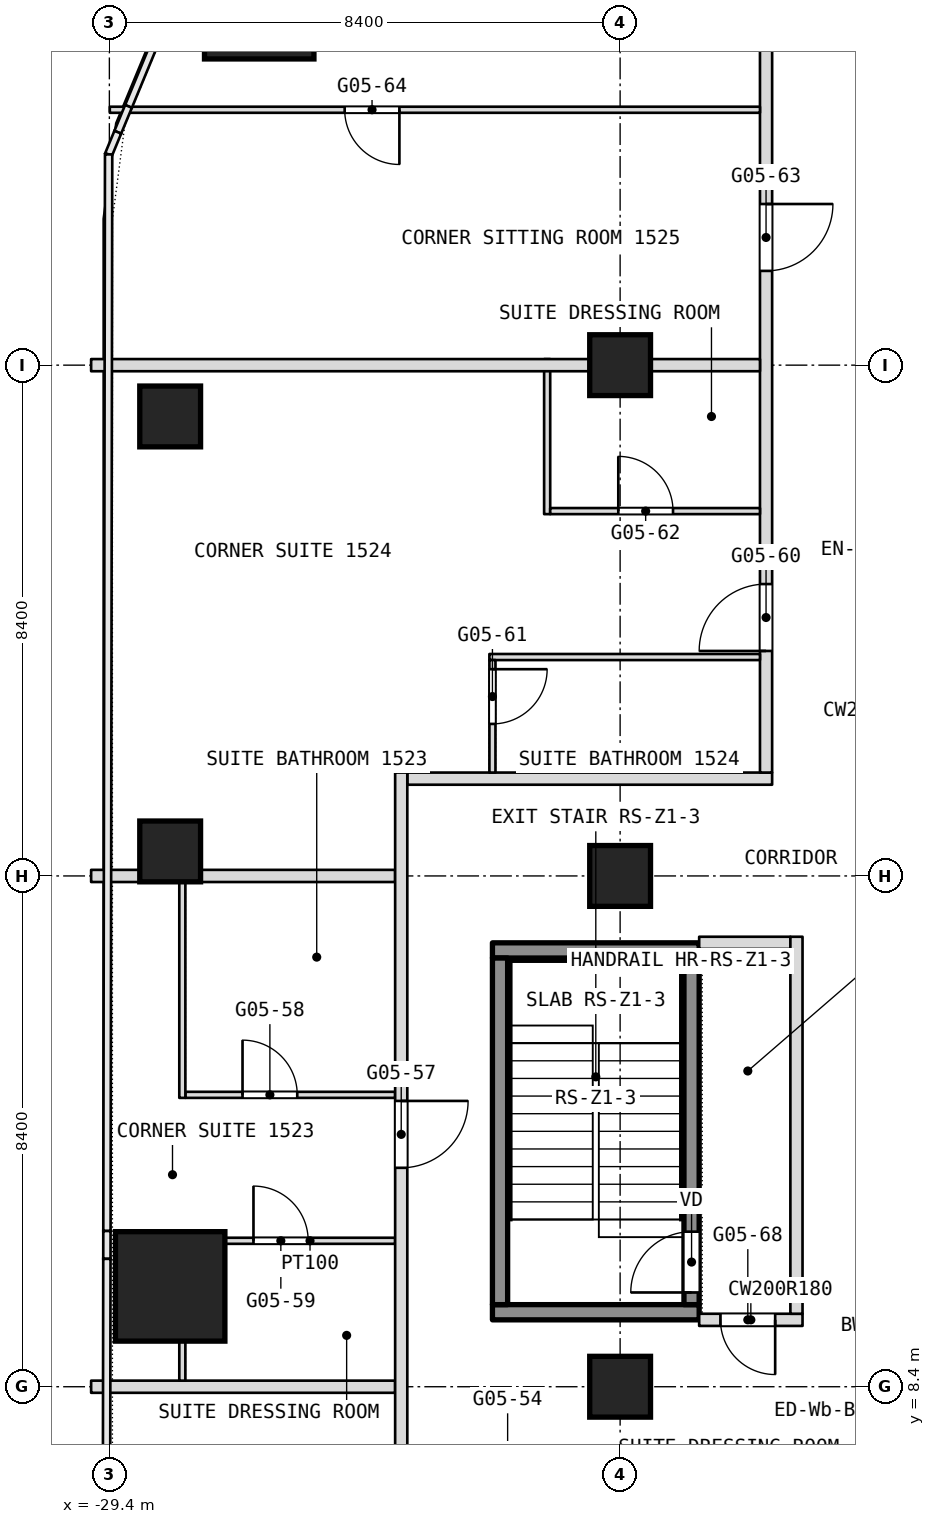
"""IFC4 building model, lengths in metres.
Left out: names, types, materials, properties, quantities, classifications, styles, units other than length and angle.
Written with IfcOpenShell. Run it as: python <this file> out.ifc"""

import sys

from ifc_helpers import new_model, si_unit, direction, frame, frame_2d, origin, origin_2d, place, context, subcontext, project, spatial, rectangle, extrude, element, fill, save


model = new_model("IFC4")
c1 = context("Model", 3, precision=1e-05, world=origin(), true_north=direction((0.0, 1.0)))
c2 = subcontext(c1, "Body", "Model", "MODEL_VIEW")
j1 = project(units=[si_unit("LENGTHUNIT", "METRE"), si_unit("PLANEANGLEUNIT", "RADIAN")], contexts=[c1])
p1 = place(None, origin())
s1 = spatial("IfcSite", under=j1, at=p1, CompositionType="ELEMENT")
p2 = place(p1, origin())
s2 = spatial("IfcBuilding", under=s1, at=p2, CompositionType="ELEMENT")
p3 = place(p2, frame((0.0, 0.0, 68.9)))
s3 = spatial("IfcBuildingStorey", under=s2, at=p3, CompositionType="ELEMENT", Elevation=68.9)
for number, where, z_axis, x_axis in (
    (1, (-26.936, 31.135, 0.0), (0.0, 0.0, 1.0), (1.0, 0.0, 0.0)),
    (2, (-28.4, 10.05, 0.0), (0.0, 0.0, 1.0), (1.0, 0.0, 0.0)),
):
    element("IfcColumn", number, at=place(p3, frame(where, z_axis=z_axis, x_axis=x_axis)), inside=s3, PredefinedType="COLUMN", context=c2, shape_type="SweptSolid", body=[
        extrude(rectangle(XDim=1.8, YDim=1.8, at=origin_2d()), origin(), (0.0, 0.0, 1.0), 3.6),
    ])
for number, where, z_axis, x_axis in (
    (3, (-21.0, 8.4, 0.0), (0.0, 0.0, 1.0), (1.0, 0.0, 0.0)),
    (4, (-21.0, 16.8, 0.0), (0.0, 0.0, 1.0), (1.0, 0.0, 0.0)),
    (5, (-21.0, 25.2, 0.0), (0.0, 0.0, 1.0), (1.0, 0.0, 0.0)),
    (6, (-28.4, 17.203, 0.0), (0.0, 0.0, 1.0), (1.0, 0.0, 0.0)),
    (7, (-28.4, 24.356, 0.0), (0.0, 0.0, 1.0), (1.0, 0.0, 0.0)),
):
    element("IfcColumn", number, at=place(p3, frame(where, z_axis=z_axis, x_axis=x_axis)), inside=s3, PredefinedType="COLUMN", context=c2, shape_type="SweptSolid", body=[
        extrude(rectangle(XDim=1.0, YDim=1.0, at=origin_2d()), origin(), (0.0, 0.0, 1.0), 3.6),
    ])
p4 = place(p3, frame((-29.7, 8.4, 0.0), z_axis=(0.0, 0.0, 1.0), x_axis=(1.0, 0.0, 0.0)))
e8 = element("IfcWall", 8, at=p4, inside=s3, PredefinedType="PARTITIONING", context=c2, shape_type="SweptSolid", body=[
    extrude(rectangle(XDim=5.0, YDim=0.2, at=frame_2d((2.5, 0.0))), origin(), (0.0, 0.0, 1.0), 2.84),
])
p5 = place(p3, frame((-19.7, 9.5, 0.0), z_axis=(0.0, 0.0, 1.0), x_axis=(1.0, 0.0, 0.0)))
e9 = element("IfcWall", 9, at=p5, inside=s3, PredefinedType="PARTITIONING", context=c2, shape_type="SweptSolid", body=[
    extrude(rectangle(XDim=1.7, YDim=0.2, at=frame_2d((0.85, 0.0))), origin(), (0.0, 0.0, 1.0), 3.34),
])
p6 = place(p5, frame((0.35, 0.0, 0.0)))
e10 = element("IfcOpeningElement", 10, at=p6, cuts=e9, PredefinedType="OPENING", context=c2, shape_type="SweptSolid", body=[
    extrude(rectangle(XDim=0.9, YDim=2.1, at=frame_2d((0.45, 1.05))), frame((0.0, 0.1, 0.0), z_axis=(0.0, -1.0, 0.0), x_axis=(1.0, 0.0, 0.0)), (0.0, 0.0, 1.0), 0.2),
])
p7 = place(p3, frame((-27.5, 10.8, 0.0), z_axis=(0.0, 0.0, 1.0), x_axis=(1.0, 0.0, 0.0)))
e11 = element("IfcWall", 11, at=p7, inside=s3, PredefinedType="PARTITIONING", context=c2, shape_type="SweptSolid", body=[
    extrude(rectangle(XDim=2.8, YDim=0.1, at=frame_2d((1.4, 0.0))), origin(), (0.0, 0.0, 1.0), 3.34),
])
p8 = place(p7, frame((0.47, 0.0, 0.0)))
e12 = element("IfcOpeningElement", 12, at=p8, cuts=e11, PredefinedType="OPENING", context=c2, shape_type="SweptSolid", body=[
    extrude(rectangle(XDim=0.9, YDim=2.1, at=frame_2d((0.45, 1.05))), frame((0.0, 0.05, 0.0), z_axis=(0.0, -1.0, 0.0), x_axis=(1.0, 0.0, 0.0)), (0.0, 0.0, 1.0), 0.1),
])
p9 = place(p3, frame((-28.15, 13.2, 0.0), z_axis=(0.0, 0.0, 1.0), x_axis=(1.0, 0.0, 0.0)))
e13 = element("IfcWall", 13, at=p9, inside=s3, PredefinedType="PARTITIONING", context=c2, shape_type="SweptSolid", body=[
    extrude(rectangle(XDim=3.45, YDim=0.1, at=frame_2d((1.725, 0.0))), origin(), (0.0, 0.0, 1.0), 3.34),
])
p10 = place(p9, frame((0.94, 0.0, 0.0)))
e14 = element("IfcOpeningElement", 14, at=p10, cuts=e13, PredefinedType="OPENING", context=c2, shape_type="SweptSolid", body=[
    extrude(rectangle(XDim=0.9, YDim=2.1, at=frame_2d((0.45, 1.05))), frame((0.0, 0.05, 0.0), z_axis=(0.0, -1.0, 0.0), x_axis=(1.0, 0.0, 0.0)), (0.0, 0.0, 1.0), 0.1),
])
p11 = place(p3, frame((-19.7, 15.7, 0.0), z_axis=(0.0, 0.0, 1.0), x_axis=(1.0, 0.0, 0.0)))
e15 = element("IfcWall", 15, at=p11, inside=s3, PredefinedType="PARTITIONING", context=c2, shape_type="SweptSolid", body=[
    extrude(rectangle(XDim=1.5, YDim=0.2, at=frame_2d((0.75, 0.0))), origin(), (0.0, 0.0, 1.0), 3.34),
])
p12 = place(p3, frame((-29.7, 16.8, 0.0), z_axis=(0.0, 0.0, 1.0), x_axis=(1.0, 0.0, 0.0)))
e16 = element("IfcWall", 16, at=p12, inside=s3, PredefinedType="PARTITIONING", context=c2, shape_type="SweptSolid", body=[
    extrude(rectangle(XDim=5.0, YDim=0.2, at=frame_2d((2.5, 0.0))), origin(), (0.0, 0.0, 1.0), 2.84),
])
p13 = place(p3, frame((-18.1, 9.6, 0.0), z_axis=(0.0, 0.0, 1.0), x_axis=(0.0, 1.0, 0.0)))
e17 = element("IfcWall", 17, at=p13, inside=s3, PredefinedType="PARTITIONING", context=c2, shape_type="SweptSolid", body=[
    extrude(rectangle(XDim=6.2, YDim=0.2, at=frame_2d((3.1, 0.0))), origin(), (0.0, 0.0, 1.0), 3.34),
])
p14 = place(p3, frame((-24.5, 18.4, 0.0), z_axis=(0.0, 0.0, 1.0), x_axis=(1.0, 0.0, 0.0)))
e18 = element("IfcWall", 18, at=p14, inside=s3, PredefinedType="PARTITIONING", context=c2, shape_type="SweptSolid", body=[
    extrude(rectangle(XDim=6.0, YDim=0.2, at=frame_2d((3.0, 0.0))), origin(), (0.0, 0.0, 1.0), 3.34),
])
p15 = place(p3, frame((-18.6, 18.5, 0.0), z_axis=(0.0, 0.0, 1.0), x_axis=(0.0, 1.0, 0.0)))
e19 = element("IfcWall", 19, at=p15, inside=s3, PredefinedType="PARTITIONING", context=c2, shape_type="SweptSolid", body=[
    extrude(rectangle(XDim=15.04, YDim=0.2, at=frame_2d((7.52, 0.0))), origin(), (0.0, 0.0, 1.0), 3.34),
])
p16 = place(p15, frame((2.0, 0.0, 0.0)))
e20 = element("IfcOpeningElement", 20, at=p16, cuts=e19, PredefinedType="OPENING", context=c2, shape_type="SweptSolid", body=[
    extrude(rectangle(XDim=1.1, YDim=2.1, at=frame_2d((0.55, 1.05))), frame((0.0, 0.1, 0.0), z_axis=(0.0, -1.0, 0.0), x_axis=(1.0, 0.0, 0.0)), (0.0, 0.0, 1.0), 0.2),
])
p17 = place(p15, frame((8.25, 0.0, 0.0)))
e21 = element("IfcOpeningElement", 21, at=p17, cuts=e19, PredefinedType="OPENING", context=c2, shape_type="SweptSolid", body=[
    extrude(rectangle(XDim=1.1, YDim=2.1, at=frame_2d((0.55, 1.05))), frame((0.0, 0.1, 0.0), z_axis=(0.0, -1.0, 0.0), x_axis=(1.0, 0.0, 0.0)), (0.0, 0.0, 1.0), 0.2),
])
p18 = place(p3, frame((-23.15, 20.4, 0.0), z_axis=(0.0, 0.0, 1.0), x_axis=(1.0, 0.0, 0.0)))
e22 = element("IfcWall", 22, at=p18, inside=s3, PredefinedType="PARTITIONING", context=c2, shape_type="SweptSolid", body=[
    extrude(rectangle(XDim=4.45, YDim=0.1, at=frame_2d((2.225, 0.0))), origin(), (0.0, 0.0, 1.0), 3.34),
])
p19 = place(p3, frame((-22.2, 22.75, 0.0), z_axis=(0.0, 0.0, 1.0), x_axis=(0.0, 1.0, 0.0)))
e23 = element("IfcWall", 23, at=p19, inside=s3, PredefinedType="PARTITIONING", context=c2, shape_type="SweptSolid", body=[
    extrude(rectangle(XDim=2.55, YDim=0.1, at=frame_2d((1.275, 0.0))), origin(), (0.0, 0.0, 1.0), 3.34),
])
p20 = place(p3, frame((-22.15, 22.8, 0.0), z_axis=(0.0, 0.0, 1.0), x_axis=(1.0, 0.0, 0.0)))
e24 = element("IfcWall", 24, at=p20, inside=s3, PredefinedType="PARTITIONING", context=c2, shape_type="SweptSolid", body=[
    extrude(rectangle(XDim=3.45, YDim=0.1, at=frame_2d((1.725, 0.0))), origin(), (0.0, 0.0, 1.0), 3.34),
])
p21 = place(p20, frame((1.12, 0.0, 0.0)))
e25 = element("IfcOpeningElement", 25, at=p21, cuts=e24, PredefinedType="OPENING", context=c2, shape_type="SweptSolid", body=[
    extrude(rectangle(XDim=0.9, YDim=2.1, at=frame_2d((0.45, 1.05))), frame((0.0, 0.05, 0.0), z_axis=(0.0, -1.0, 0.0), x_axis=(1.0, 0.0, 0.0)), (0.0, 0.0, 1.0), 0.1),
])
p22 = place(p3, frame((-23.1, 18.5, 0.0), z_axis=(0.0, 0.0, 1.0), x_axis=(0.0, 1.0, 0.0)))
e26 = element("IfcWall", 26, at=p22, inside=s3, PredefinedType="PARTITIONING", context=c2, shape_type="SweptSolid", body=[
    extrude(rectangle(XDim=1.85, YDim=0.1, at=frame_2d((0.925, 0.0))), origin(), (0.0, 0.0, 1.0), 3.34),
])
p23 = place(p22, frame((0.8, 0.0, 0.0)))
e27 = element("IfcOpeningElement", 27, at=p23, cuts=e26, PredefinedType="OPENING", context=c2, shape_type="SweptSolid", body=[
    extrude(rectangle(XDim=0.9, YDim=2.1, at=frame_2d((0.45, 1.05))), frame((0.0, 0.05, 0.0), z_axis=(0.0, -1.0, 0.0), x_axis=(1.0, 0.0, 0.0)), (0.0, 0.0, 1.0), 0.1),
])
p24 = place(p3, frame((-24.6, 6.9, 0.0), z_axis=(0.0, 0.0, 1.0), x_axis=(0.0, 1.0, 0.0)))
e28 = element("IfcWall", 28, at=p24, inside=s3, PredefinedType="PARTITIONING", context=c2, shape_type="SweptSolid", body=[
    extrude(rectangle(XDim=11.6, YDim=0.2, at=frame_2d((5.8, 0.0))), origin(), (0.0, 0.0, 1.0), 3.34),
])
p25 = place(p24, frame((5.1, 0.0, 0.0)))
e29 = element("IfcOpeningElement", 29, at=p25, cuts=e28, PredefinedType="OPENING", context=c2, shape_type="SweptSolid", body=[
    extrude(rectangle(XDim=1.1, YDim=2.1, at=frame_2d((0.55, 1.05))), frame((0.0, 0.1, 0.0), z_axis=(0.0, -1.0, 0.0), x_axis=(1.0, 0.0, 0.0)), (0.0, 0.0, 1.0), 0.2),
])
p26 = place(p3, frame((-29.7, 25.2, 0.0), z_axis=(0.0, 0.0, 1.0), x_axis=(1.0, 0.0, 0.0)))
e30 = element("IfcWall", 30, at=p26, inside=s3, PredefinedType="PARTITIONING", context=c2, shape_type="SweptSolid", body=[
    extrude(rectangle(XDim=11.0, YDim=0.2, at=frame_2d((5.5, 0.0))), origin(), (0.0, 0.0, 1.0), 2.84),
])
p27 = place(p3, frame((-28.2, 8.5, 0.0), z_axis=(0.0, 0.0, 1.0), x_axis=(0.0, 1.0, 0.0)))
e31 = element("IfcWall", 31, at=p27, inside=s3, PredefinedType="PARTITIONING", context=c2, shape_type="SweptSolid", body=[
    extrude(rectangle(XDim=0.65, YDim=0.1, at=frame_2d((0.325, 0.0))), origin(), (0.0, 0.0, 1.0), 2.94),
])
p28 = place(p3, frame((-28.2, 13.15, 0.0), z_axis=(0.0, 0.0, 1.0), x_axis=(0.0, 1.0, 0.0)))
e32 = element("IfcWall", 32, at=p28, inside=s3, PredefinedType="PARTITIONING", context=c2, shape_type="SweptSolid", body=[
    extrude(rectangle(XDim=3.75, YDim=0.1, at=frame_2d((1.875, 0.0))), origin(), (0.0, 0.0, 1.0), 2.94),
])
p29 = place(p3, frame((-29.393, 29.4, 0.0), z_axis=(0.0, 0.0, 1.0), x_axis=(1.0, 0.0, 0.0)))
e33 = element("IfcWall", 33, at=p29, inside=s3, PredefinedType="PARTITIONING", context=c2, shape_type="SweptSolid", body=[
    extrude(rectangle(XDim=10.693, YDim=0.1, at=frame_2d((5.347, 0.0))), origin(), (0.0, 0.0, 1.0), 3.34),
])
p30 = place(p29, frame((3.863, 0.0, 0.0)))
e34 = element("IfcOpeningElement", 34, at=p30, cuts=e33, PredefinedType="OPENING", context=c2, shape_type="SweptSolid", body=[
    extrude(rectangle(XDim=0.9, YDim=2.1, at=frame_2d((0.45, 1.05))), frame((0.0, 0.05, 0.0), z_axis=(0.0, -1.0, 0.0), x_axis=(1.0, 0.0, 0.0)), (0.0, 0.0, 1.0), 0.1),
])
for number, where, z_axis, x_axis in (
    (35, (-23.1, 9.625, 0.1), (0.0, 0.0, 1.0), (1.0, 0.0, 0.0)),
    (36, (-23.1, 15.575, 0.1), (0.0, 0.0, 1.0), (1.0, 0.0, 0.0)),
):
    element("IfcWall", number, at=place(p3, frame(where, z_axis=z_axis, x_axis=x_axis)), inside=s3, PredefinedType="SHEAR", context=c2, shape_type="SweptSolid", body=[
        extrude(rectangle(XDim=3.4, YDim=0.25, at=frame_2d((1.7, 0.0))), origin(), (0.0, 0.0, 1.0), 3.6),
    ])
p31 = place(p3, frame((-22.975, 9.75, 0.1), z_axis=(0.0, 0.0, 1.0), x_axis=(0.0, 1.0, 0.0)))
e37 = element("IfcWall", 37, at=p31, inside=s3, PredefinedType="SHEAR", context=c2, shape_type="SweptSolid", body=[
    extrude(rectangle(XDim=5.7, YDim=0.25, at=frame_2d((2.85, 0.0))), origin(), (0.0, 0.0, 1.0), 3.6),
])
p32 = place(p3, frame((-19.825, 9.75, 0.1), z_axis=(0.0, 0.0, 1.0), x_axis=(0.0, 1.0, 0.0)))
e38 = element("IfcWall", 38, at=p32, inside=s3, PredefinedType="SHEAR", context=c2, shape_type="SweptSolid", body=[
    extrude(rectangle(XDim=5.7, YDim=0.25, at=frame_2d((2.85, 0.0))), origin(), (0.0, 0.0, 1.0), 3.6),
])
p33 = place(p32, frame((0.2, 0.0, 0.0)))
e39 = element("IfcOpeningElement", 39, at=p33, cuts=e38, PredefinedType="OPENING", context=c2, shape_type="SweptSolid", body=[
    extrude(rectangle(XDim=1.0, YDim=2.1, at=frame_2d((0.5, 1.05))), frame((0.0, 0.125, 0.0), z_axis=(0.0, -1.0, 0.0), x_axis=(1.0, 0.0, 0.0)), (0.0, 0.0, 1.0), 0.25),
])
p34 = place(p6, origin())
e40 = element("IfcDoor", 40, at=p34, inside=s3, OperationType="SINGLE_SWING_RIGHT", PredefinedType="DOOR", context=c2, shape_type="SweptSolid", body=[
    extrude(rectangle(XDim=0.9, YDim=2.1, at=frame_2d((0.45, 1.05))), frame((0.0, 0.025, 0.0), z_axis=(0.0, -1.0, 0.0), x_axis=(1.0, 0.0, 0.0)), (0.0, 0.0, 1.0), 0.05),
])
fill(e10, e40)
p35 = place(p8, origin())
e41 = element("IfcDoor", 41, at=p35, inside=s3, OperationType="SINGLE_SWING_RIGHT", PredefinedType="DOOR", context=c2, shape_type="SweptSolid", body=[
    extrude(rectangle(XDim=0.9, YDim=2.1, at=frame_2d((0.45, 1.05))), frame((0.0, 0.025, 0.0), z_axis=(0.0, -1.0, 0.0), x_axis=(1.0, 0.0, 0.0)), (0.0, 0.0, 1.0), 0.05),
])
fill(e12, e41)
p36 = place(p10, origin())
e42 = element("IfcDoor", 42, at=p36, inside=s3, OperationType="SINGLE_SWING_LEFT", PredefinedType="DOOR", context=c2, shape_type="SweptSolid", body=[
    extrude(rectangle(XDim=0.9, YDim=2.1, at=frame_2d((0.45, 1.05))), frame((0.0, 0.025, 0.0), z_axis=(0.0, -1.0, 0.0), x_axis=(1.0, 0.0, 0.0)), (0.0, 0.0, 1.0), 0.05),
])
fill(e14, e42)
p37 = place(p16, origin())
e43 = element("IfcDoor", 43, at=p37, inside=s3, OperationType="SINGLE_SWING_LEFT", PredefinedType="DOOR", context=c2, shape_type="SweptSolid", body=[
    extrude(rectangle(XDim=1.1, YDim=2.1, at=frame_2d((0.55, 1.05))), frame((0.0, 0.025, 0.0), z_axis=(0.0, -1.0, 0.0), x_axis=(1.0, 0.0, 0.0)), (0.0, 0.0, 1.0), 0.05),
])
fill(e20, e43)
p38 = place(p17, origin())
e44 = element("IfcDoor", 44, at=p38, inside=s3, OperationType="SINGLE_SWING_RIGHT", PredefinedType="DOOR", context=c2, shape_type="SweptSolid", body=[
    extrude(rectangle(XDim=1.1, YDim=2.1, at=frame_2d((0.55, 1.05))), frame((0.0, 0.025, 0.0), z_axis=(0.0, -1.0, 0.0), x_axis=(1.0, 0.0, 0.0)), (0.0, 0.0, 1.0), 0.05),
])
fill(e21, e44)
p39 = place(p21, origin())
e45 = element("IfcDoor", 45, at=p39, inside=s3, OperationType="SINGLE_SWING_LEFT", PredefinedType="DOOR", context=c2, shape_type="SweptSolid", body=[
    extrude(rectangle(XDim=0.9, YDim=2.1, at=frame_2d((0.45, 1.05))), frame((0.0, 0.025, 0.0), z_axis=(0.0, -1.0, 0.0), x_axis=(1.0, 0.0, 0.0)), (0.0, 0.0, 1.0), 0.05),
])
fill(e25, e45)
p40 = place(p23, origin())
e46 = element("IfcDoor", 46, at=p40, inside=s3, OperationType="SINGLE_SWING_LEFT", PredefinedType="DOOR", context=c2, shape_type="SweptSolid", body=[
    extrude(rectangle(XDim=0.9, YDim=2.1, at=frame_2d((0.45, 1.05))), frame((0.0, 0.025, 0.0), z_axis=(0.0, -1.0, 0.0), x_axis=(1.0, 0.0, 0.0)), (0.0, 0.0, 1.0), 0.05),
])
fill(e27, e46)
p41 = place(p25, origin())
e47 = element("IfcDoor", 47, at=p41, inside=s3, OperationType="SINGLE_SWING_RIGHT", PredefinedType="DOOR", context=c2, shape_type="SweptSolid", body=[
    extrude(rectangle(XDim=1.1, YDim=2.1, at=frame_2d((0.55, 1.05))), frame((0.0, 0.025, 0.0), z_axis=(0.0, -1.0, 0.0), x_axis=(1.0, 0.0, 0.0)), (0.0, 0.0, 1.0), 0.05),
])
fill(e29, e47)
p42 = place(p30, origin())
e48 = element("IfcDoor", 48, at=p42, inside=s3, OperationType="SINGLE_SWING_LEFT", PredefinedType="DOOR", context=c2, shape_type="SweptSolid", body=[
    extrude(rectangle(XDim=0.9, YDim=2.1, at=frame_2d((0.45, 1.05))), frame((0.0, 0.025, 0.0), z_axis=(0.0, -1.0, 0.0), x_axis=(1.0, 0.0, 0.0)), (0.0, 0.0, 1.0), 0.05),
])
fill(e34, e48)
p43 = place(p33, origin())
e49 = element("IfcDoor", 49, at=p43, inside=s3, OperationType="SINGLE_SWING_LEFT", PredefinedType="DOOR", context=c2, shape_type="SweptSolid", body=[
    extrude(rectangle(XDim=1.0, YDim=2.1, at=frame_2d((0.5, 1.05))), frame((0.0, 0.025, 0.0), z_axis=(0.0, -1.0, 0.0), x_axis=(1.0, 0.0, 0.0)), (0.0, 0.0, 1.0), 0.05),
])
fill(e39, e49)
save(model, sys.argv[1])
